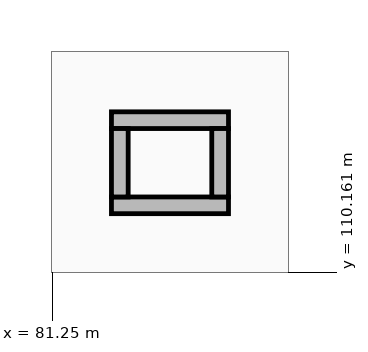
"""IFC4 building model, lengths in metres.
Left out: names, types, materials, properties, quantities, classifications, styles, units other than length and angle.
Written with IfcOpenShell. Run it as: python <this file> out.ifc"""

import sys

from ifc_helpers import new_model, si_unit, direction, frame, frame_2d, origin, place, context, subcontext, project, spatial, rectangle, extrude, element, save


model = new_model("IFC4")
c1 = context("Model", 3, precision=1e-05, world=origin(), true_north=direction((0.0, 1.0)))
c2 = subcontext(c1, "Body", "Model", "MODEL_VIEW")
j1 = project(units=[si_unit("LENGTHUNIT", "METRE"), si_unit("PLANEANGLEUNIT", "RADIAN")], contexts=[c1])
p1 = place(None, origin())
s1 = spatial("IfcSite", under=j1, at=p1, CompositionType="ELEMENT")
p2 = place(p1, origin())
s2 = spatial("IfcBuilding", under=s1, at=p2, CompositionType="ELEMENT")
p3 = place(p2, origin())
s3 = spatial("IfcBuildingStorey", under=s2, at=p3, CompositionType="ELEMENT", Elevation=0.0)
for number, where, z_axis, x_axis in (
    (1, (82.03, 111.04, 0.0), (0.0, 0.0, 1.0), (1.0, 0.0, 0.0)),
    (2, (82.03, 112.16, 0.0), (0.0, 0.0, 1.0), (1.0, 0.0, 0.0)),
):
    element("IfcWall", number, at=place(p3, frame(where, z_axis=z_axis, x_axis=x_axis)), inside=s3, PredefinedType="STANDARD", context=c2, shape_type="SweptSolid", body=[
        extrude(rectangle(XDim=1.54, YDim=0.22, at=frame_2d((0.77, 0.0))), origin(), (0.0, 0.0, 1.0), 2.6),
    ])
for number, where, z_axis, x_axis in (
    (3, (82.14, 111.15, 0.0), (0.0, 0.0, 1.0), (0.0, 1.0, 0.0)),
    (4, (83.46, 111.15, 0.0), (0.0, 0.0, 1.0), (0.0, 1.0, 0.0)),
):
    element("IfcWall", number, at=place(p3, frame(where, z_axis=z_axis, x_axis=x_axis)), inside=s3, PredefinedType="STANDARD", context=c2, shape_type="SweptSolid", body=[
        extrude(rectangle(XDim=0.9, YDim=0.22, at=frame_2d((0.45, 0.0))), origin(), (0.0, 0.0, 1.0), 2.6),
    ])
save(model, sys.argv[1])
